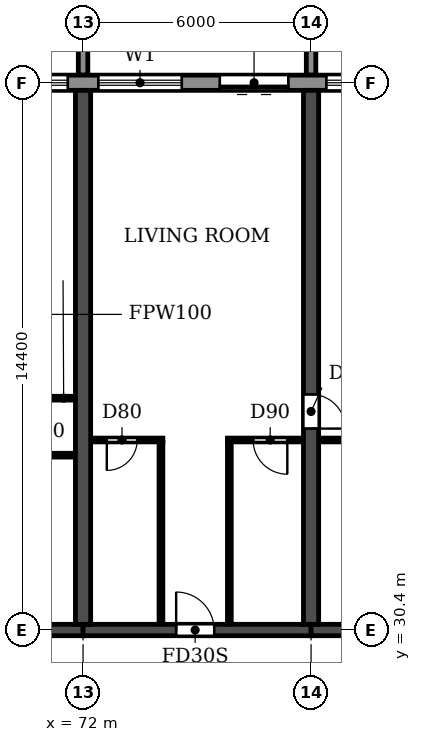
"""IFC4 building model, lengths in metres.
Left out: names, types, materials, properties, quantities, classifications, styles, units other than length and angle.
Written with IfcOpenShell. Run it as: python <this file> out.ifc"""

import sys

from ifc_helpers import new_model, si_unit, direction, frame, frame_2d, origin, place, context, subcontext, project, spatial, polyline, rectangle, outline, extrude, source, transform, mapped, element, fill, save


model = new_model("IFC4")
c1 = context("Model", 3, precision=1e-05, world=origin(), true_north=direction((0.0, 1.0)))
c2 = subcontext(c1, "Body", "Model", "MODEL_VIEW")
j1 = project(units=[si_unit("LENGTHUNIT", "METRE"), si_unit("PLANEANGLEUNIT", "RADIAN")], contexts=[c1])
p1 = place(None, origin())
s1 = spatial("IfcSite", under=j1, at=p1, CompositionType="ELEMENT")
p2 = place(p1, origin())
s2 = spatial("IfcBuilding", under=s1, at=p2, CompositionType="ELEMENT")
p3 = place(p2, frame((0.0, 0.0, 26.7)))
s3 = spatial("IfcBuildingStorey", under=s2, at=p3, CompositionType="ELEMENT", Elevation=26.7)
p4 = place(p3, frame((72.0, 30.55, 0.0), z_axis=(0.0, 0.0, 1.0), x_axis=(0.0, 1.0, 0.0)))
e1 = element("IfcWall", 1, at=p4, inside=s3, PredefinedType="SHEAR", context=c2, shape_type="SweptSolid", body=[
    extrude(rectangle(XDim=14.05, YDim=0.4, at=frame_2d((7.025, 0.0))), origin(), (0.0, 0.0, 1.0), 3.05),
])
p5 = place(p3, frame((78.0, 30.55, 0.0), z_axis=(0.0, 0.0, 1.0), x_axis=(0.0, 1.0, 0.0)))
e2 = element("IfcWall", 2, at=p5, inside=s3, PredefinedType="SHEAR", context=c2, shape_type="SweptSolid", body=[
    extrude(rectangle(XDim=14.05, YDim=0.4, at=frame_2d((7.025, 0.0))), origin(), (0.0, 0.0, 1.0), 3.05),
])
p6 = place(p5, frame((5.15, 0.0, 0.0)))
e3 = element("IfcOpeningElement", 3, at=p6, cuts=e2, PredefinedType="OPENING", context=c2, shape_type="SweptSolid", body=[
    extrude(rectangle(XDim=0.9, YDim=2.1, at=frame_2d((0.45, 1.05))), frame((0.0, 0.21, 0.0), z_axis=(0.0, -1.0, 0.0), x_axis=(1.0, 0.0, 0.0)), (0.0, 0.0, 1.0), 0.42),
])
p7 = place(p3, frame((66.0, 30.4, 0.0), z_axis=(0.0, 0.0, 1.0), x_axis=(1.0, 0.0, 0.0)))
e4 = element("IfcWall", 4, at=p7, inside=s3, PredefinedType="SHEAR", context=c2, shape_type="SweptSolid", body=[
    extrude(rectangle(XDim=6.0, YDim=0.3, at=frame_2d((3.0, 0.0))), origin(), (0.0, 0.0, 1.0), 2.45),
])
p8 = place(p3, frame((72.0, 30.4, 0.0), z_axis=(0.0, 0.0, 1.0), x_axis=(1.0, 0.0, 0.0)))
e5 = element("IfcWall", 5, at=p8, inside=s3, PredefinedType="SHEAR", context=c2, shape_type="SweptSolid", body=[
    extrude(rectangle(XDim=6.0, YDim=0.3, at=frame_2d((3.0, 0.0))), origin(), (0.0, 0.0, 1.0), 2.45),
])
p9 = place(p8, frame((2.45, 0.0, 0.0)))
e6 = element("IfcOpeningElement", 6, at=p9, cuts=e5, PredefinedType="OPENING", context=c2, shape_type="SweptSolid", body=[
    extrude(rectangle(XDim=1.0, YDim=2.1, at=frame_2d((0.5, 1.05))), frame((0.0, 0.16, 0.0), z_axis=(0.0, -1.0, 0.0), x_axis=(1.0, 0.0, 0.0)), (0.0, 0.0, 1.0), 0.32),
])
p10 = place(p3, frame((78.0, 30.4, 0.0), z_axis=(0.0, 0.0, 1.0), x_axis=(1.0, 0.0, 0.0)))
e7 = element("IfcWall", 7, at=p10, inside=s3, PredefinedType="SHEAR", context=c2, shape_type="SweptSolid", body=[
    extrude(rectangle(XDim=6.0, YDim=0.3, at=frame_2d((3.0, 0.0))), origin(), (0.0, 0.0, 1.0), 2.45),
])
p11 = place(p3, frame((97.317, 44.8, 0.0), z_axis=(0.0, 0.0, 1.0), x_axis=(-1.0, 0.0, 0.0)))
e8 = element("IfcWall", 8, at=p11, inside=s3, PredefinedType="STANDARD", context=c2, shape_type="SweptSolid", body=[
    extrude(rectangle(XDim=92.634, YDim=0.4, at=frame_2d((46.317, 0.0))), origin(), (0.0, 0.0, 1.0), 3.05),
])
p12 = place(p11, frame((88.717, 0.0, 0.9)))
e9 = element("IfcOpeningElement", 9, at=p12, cuts=e8, PredefinedType="OPENING", context=c2, shape_type="SweptSolid", body=[
    extrude(rectangle(XDim=2.2, YDim=1.5, at=frame_2d((1.1, 0.75))), frame((0.0, 0.21, 0.0), z_axis=(0.0, -1.0, 0.0), x_axis=(1.0, 0.0, 0.0)), (0.0, 0.0, 1.0), 0.42),
])
p13 = place(p11, frame((85.917, 0.0, 0.0)))
e10 = element("IfcOpeningElement", 10, at=p13, cuts=e8, PredefinedType="OPENING", context=c2, shape_type="SweptSolid", body=[
    extrude(rectangle(XDim=1.8, YDim=2.4, at=frame_2d((0.9, 1.2))), frame((0.0, 0.21, 0.0), z_axis=(0.0, -1.0, 0.0), x_axis=(1.0, 0.0, 0.0)), (0.0, 0.0, 1.0), 0.42),
])
p14 = place(p11, frame((82.717, 0.0, 0.9)))
e11 = element("IfcOpeningElement", 11, at=p14, cuts=e8, PredefinedType="OPENING", context=c2, shape_type="SweptSolid", body=[
    extrude(rectangle(XDim=2.2, YDim=1.5, at=frame_2d((1.1, 0.75))), frame((0.0, 0.21, 0.0), z_axis=(0.0, -1.0, 0.0), x_axis=(1.0, 0.0, 0.0)), (0.0, 0.0, 1.0), 0.42),
])
p15 = place(p11, frame((79.717, 0.0, 0.9)))
e12 = element("IfcOpeningElement", 12, at=p15, cuts=e8, PredefinedType="OPENING", context=c2, shape_type="SweptSolid", body=[
    extrude(rectangle(XDim=2.2, YDim=1.5, at=frame_2d((1.1, 0.75))), frame((0.0, 0.21, 0.0), z_axis=(0.0, -1.0, 0.0), x_axis=(1.0, 0.0, 0.0)), (0.0, 0.0, 1.0), 0.42),
])
p16 = place(p11, frame((76.917, 0.0, 0.0)))
e13 = element("IfcOpeningElement", 13, at=p16, cuts=e8, PredefinedType="OPENING", context=c2, shape_type="SweptSolid", body=[
    extrude(rectangle(XDim=1.8, YDim=2.4, at=frame_2d((0.9, 1.2))), frame((0.0, 0.21, 0.0), z_axis=(0.0, -1.0, 0.0), x_axis=(1.0, 0.0, 0.0)), (0.0, 0.0, 1.0), 0.42),
])
p17 = place(p11, frame((73.717, 0.0, 0.9)))
e14 = element("IfcOpeningElement", 14, at=p17, cuts=e8, PredefinedType="OPENING", context=c2, shape_type="SweptSolid", body=[
    extrude(rectangle(XDim=2.2, YDim=1.5, at=frame_2d((1.1, 0.75))), frame((0.0, 0.21, 0.0), z_axis=(0.0, -1.0, 0.0), x_axis=(1.0, 0.0, 0.0)), (0.0, 0.0, 1.0), 0.42),
])
p18 = place(p11, frame((70.717, 0.0, 0.9)))
e15 = element("IfcOpeningElement", 15, at=p18, cuts=e8, PredefinedType="OPENING", context=c2, shape_type="SweptSolid", body=[
    extrude(rectangle(XDim=2.2, YDim=1.5, at=frame_2d((1.1, 0.75))), frame((0.0, 0.21, 0.0), z_axis=(0.0, -1.0, 0.0), x_axis=(1.0, 0.0, 0.0)), (0.0, 0.0, 1.0), 0.42),
])
p19 = place(p11, frame((67.717, 0.0, 0.9)))
e16 = element("IfcOpeningElement", 16, at=p19, cuts=e8, PredefinedType="OPENING", context=c2, shape_type="SweptSolid", body=[
    extrude(rectangle(XDim=2.2, YDim=1.5, at=frame_2d((1.1, 0.75))), frame((0.0, 0.21, 0.0), z_axis=(0.0, -1.0, 0.0), x_axis=(1.0, 0.0, 0.0)), (0.0, 0.0, 1.0), 0.42),
])
p20 = place(p11, frame((64.917, 0.0, 0.0)))
e17 = element("IfcOpeningElement", 17, at=p20, cuts=e8, PredefinedType="OPENING", context=c2, shape_type="SweptSolid", body=[
    extrude(rectangle(XDim=1.8, YDim=2.4, at=frame_2d((0.9, 1.2))), frame((0.0, 0.21, 0.0), z_axis=(0.0, -1.0, 0.0), x_axis=(1.0, 0.0, 0.0)), (0.0, 0.0, 1.0), 0.42),
])
p21 = place(p11, frame((61.717, 0.0, 0.9)))
e18 = element("IfcOpeningElement", 18, at=p21, cuts=e8, PredefinedType="OPENING", context=c2, shape_type="SweptSolid", body=[
    extrude(rectangle(XDim=2.2, YDim=1.5, at=frame_2d((1.1, 0.75))), frame((0.0, 0.21, 0.0), z_axis=(0.0, -1.0, 0.0), x_axis=(1.0, 0.0, 0.0)), (0.0, 0.0, 1.0), 0.42),
])
p22 = place(p11, frame((58.717, 0.0, 0.9)))
e19 = element("IfcOpeningElement", 19, at=p22, cuts=e8, PredefinedType="OPENING", context=c2, shape_type="SweptSolid", body=[
    extrude(rectangle(XDim=2.2, YDim=1.5, at=frame_2d((1.1, 0.75))), frame((0.0, 0.21, 0.0), z_axis=(0.0, -1.0, 0.0), x_axis=(1.0, 0.0, 0.0)), (0.0, 0.0, 1.0), 0.42),
])
p23 = place(p11, frame((55.917, 0.0, 0.0)))
e20 = element("IfcOpeningElement", 20, at=p23, cuts=e8, PredefinedType="OPENING", context=c2, shape_type="SweptSolid", body=[
    extrude(rectangle(XDim=1.8, YDim=2.4, at=frame_2d((0.9, 1.2))), frame((0.0, 0.21, 0.0), z_axis=(0.0, -1.0, 0.0), x_axis=(1.0, 0.0, 0.0)), (0.0, 0.0, 1.0), 0.42),
])
p24 = place(p11, frame((52.917, 0.0, 0.0)))
e21 = element("IfcOpeningElement", 21, at=p24, cuts=e8, PredefinedType="OPENING", context=c2, shape_type="SweptSolid", body=[
    extrude(rectangle(XDim=1.8, YDim=2.4, at=frame_2d((0.9, 1.2))), frame((0.0, 0.21, 0.0), z_axis=(0.0, -1.0, 0.0), x_axis=(1.0, 0.0, 0.0)), (0.0, 0.0, 1.0), 0.42),
])
p25 = place(p11, frame((49.717, 0.0, 0.9)))
e22 = element("IfcOpeningElement", 22, at=p25, cuts=e8, PredefinedType="OPENING", context=c2, shape_type="SweptSolid", body=[
    extrude(rectangle(XDim=2.2, YDim=1.5, at=frame_2d((1.1, 0.75))), frame((0.0, 0.21, 0.0), z_axis=(0.0, -1.0, 0.0), x_axis=(1.0, 0.0, 0.0)), (0.0, 0.0, 1.0), 0.42),
])
p26 = place(p11, frame((46.917, 0.0, 0.0)))
e23 = element("IfcOpeningElement", 23, at=p26, cuts=e8, PredefinedType="OPENING", context=c2, shape_type="SweptSolid", body=[
    extrude(rectangle(XDim=1.8, YDim=2.4, at=frame_2d((0.9, 1.2))), frame((0.0, 0.21, 0.0), z_axis=(0.0, -1.0, 0.0), x_axis=(1.0, 0.0, 0.0)), (0.0, 0.0, 1.0), 0.42),
])
p27 = place(p11, frame((43.717, 0.0, 0.9)))
e24 = element("IfcOpeningElement", 24, at=p27, cuts=e8, PredefinedType="OPENING", context=c2, shape_type="SweptSolid", body=[
    extrude(rectangle(XDim=2.2, YDim=1.5, at=frame_2d((1.1, 0.75))), frame((0.0, 0.21, 0.0), z_axis=(0.0, -1.0, 0.0), x_axis=(1.0, 0.0, 0.0)), (0.0, 0.0, 1.0), 0.42),
])
p28 = place(p11, frame((40.717, 0.0, 0.9)))
e25 = element("IfcOpeningElement", 25, at=p28, cuts=e8, PredefinedType="OPENING", context=c2, shape_type="SweptSolid", body=[
    extrude(rectangle(XDim=2.2, YDim=1.5, at=frame_2d((1.1, 0.75))), frame((0.0, 0.21, 0.0), z_axis=(0.0, -1.0, 0.0), x_axis=(1.0, 0.0, 0.0)), (0.0, 0.0, 1.0), 0.42),
])
p29 = place(p11, frame((37.917, 0.0, 0.0)))
e26 = element("IfcOpeningElement", 26, at=p29, cuts=e8, PredefinedType="OPENING", context=c2, shape_type="SweptSolid", body=[
    extrude(rectangle(XDim=1.8, YDim=2.4, at=frame_2d((0.9, 1.2))), frame((0.0, 0.21, 0.0), z_axis=(0.0, -1.0, 0.0), x_axis=(1.0, 0.0, 0.0)), (0.0, 0.0, 1.0), 0.42),
])
p30 = place(p11, frame((34.917, 0.0, 0.0)))
e27 = element("IfcOpeningElement", 27, at=p30, cuts=e8, PredefinedType="OPENING", context=c2, shape_type="SweptSolid", body=[
    extrude(rectangle(XDim=1.8, YDim=2.4, at=frame_2d((0.9, 1.2))), frame((0.0, 0.21, 0.0), z_axis=(0.0, -1.0, 0.0), x_axis=(1.0, 0.0, 0.0)), (0.0, 0.0, 1.0), 0.42),
])
p31 = place(p11, frame((31.717, 0.0, 0.9)))
e28 = element("IfcOpeningElement", 28, at=p31, cuts=e8, PredefinedType="OPENING", context=c2, shape_type="SweptSolid", body=[
    extrude(rectangle(XDim=2.2, YDim=1.5, at=frame_2d((1.1, 0.75))), frame((0.0, 0.21, 0.0), z_axis=(0.0, -1.0, 0.0), x_axis=(1.0, 0.0, 0.0)), (0.0, 0.0, 1.0), 0.42),
])
p32 = place(p11, frame((28.717, 0.0, 0.9)))
e29 = element("IfcOpeningElement", 29, at=p32, cuts=e8, PredefinedType="OPENING", context=c2, shape_type="SweptSolid", body=[
    extrude(rectangle(XDim=2.2, YDim=1.5, at=frame_2d((1.1, 0.75))), frame((0.0, 0.21, 0.0), z_axis=(0.0, -1.0, 0.0), x_axis=(1.0, 0.0, 0.0)), (0.0, 0.0, 1.0), 0.42),
])
p33 = place(p11, frame((25.717, 0.0, 0.9)))
e30 = element("IfcOpeningElement", 30, at=p33, cuts=e8, PredefinedType="OPENING", context=c2, shape_type="SweptSolid", body=[
    extrude(rectangle(XDim=2.2, YDim=1.5, at=frame_2d((1.1, 0.75))), frame((0.0, 0.21, 0.0), z_axis=(0.0, -1.0, 0.0), x_axis=(1.0, 0.0, 0.0)), (0.0, 0.0, 1.0), 0.42),
])
p34 = place(p11, frame((22.717, 0.0, 0.9)))
e31 = element("IfcOpeningElement", 31, at=p34, cuts=e8, PredefinedType="OPENING", context=c2, shape_type="SweptSolid", body=[
    extrude(rectangle(XDim=2.2, YDim=1.5, at=frame_2d((1.1, 0.75))), frame((0.0, 0.21, 0.0), z_axis=(0.0, -1.0, 0.0), x_axis=(1.0, 0.0, 0.0)), (0.0, 0.0, 1.0), 0.42),
])
p35 = place(p11, frame((19.917, 0.0, 0.0)))
e32 = element("IfcOpeningElement", 32, at=p35, cuts=e8, PredefinedType="OPENING", context=c2, shape_type="SweptSolid", body=[
    extrude(rectangle(XDim=1.8, YDim=2.4, at=frame_2d((0.9, 1.2))), frame((0.0, 0.21, 0.0), z_axis=(0.0, -1.0, 0.0), x_axis=(1.0, 0.0, 0.0)), (0.0, 0.0, 1.0), 0.42),
])
p36 = place(p11, frame((16.717, 0.0, 0.9)))
e33 = element("IfcOpeningElement", 33, at=p36, cuts=e8, PredefinedType="OPENING", context=c2, shape_type="SweptSolid", body=[
    extrude(rectangle(XDim=2.2, YDim=1.5, at=frame_2d((1.1, 0.75))), frame((0.0, 0.21, 0.0), z_axis=(0.0, -1.0, 0.0), x_axis=(1.0, 0.0, 0.0)), (0.0, 0.0, 1.0), 0.42),
])
p37 = place(p11, frame((13.717, 0.0, 0.9)))
e34 = element("IfcOpeningElement", 34, at=p37, cuts=e8, PredefinedType="OPENING", context=c2, shape_type="SweptSolid", body=[
    extrude(rectangle(XDim=2.2, YDim=1.5, at=frame_2d((1.1, 0.75))), frame((0.0, 0.21, 0.0), z_axis=(0.0, -1.0, 0.0), x_axis=(1.0, 0.0, 0.0)), (0.0, 0.0, 1.0), 0.42),
])
p38 = place(p11, frame((10.717, 0.0, 0.9)))
e35 = element("IfcOpeningElement", 35, at=p38, cuts=e8, PredefinedType="OPENING", context=c2, shape_type="SweptSolid", body=[
    extrude(rectangle(XDim=2.2, YDim=1.5, at=frame_2d((1.1, 0.75))), frame((0.0, 0.21, 0.0), z_axis=(0.0, -1.0, 0.0), x_axis=(1.0, 0.0, 0.0)), (0.0, 0.0, 1.0), 0.42),
])
p39 = place(p11, frame((7.917, 0.0, 0.0)))
e36 = element("IfcOpeningElement", 36, at=p39, cuts=e8, PredefinedType="OPENING", context=c2, shape_type="SweptSolid", body=[
    extrude(rectangle(XDim=1.8, YDim=2.4, at=frame_2d((0.9, 1.2))), frame((0.0, 0.21, 0.0), z_axis=(0.0, -1.0, 0.0), x_axis=(1.0, 0.0, 0.0)), (0.0, 0.0, 1.0), 0.42),
])
p40 = place(p11, frame((4.917, 0.0, 0.0)))
e37 = element("IfcOpeningElement", 37, at=p40, cuts=e8, PredefinedType="OPENING", context=c2, shape_type="SweptSolid", body=[
    extrude(rectangle(XDim=1.8, YDim=2.4, at=frame_2d((0.9, 1.2))), frame((0.0, 0.21, 0.0), z_axis=(0.0, -1.0, 0.0), x_axis=(1.0, 0.0, 0.0)), (0.0, 0.0, 1.0), 0.42),
])
p41 = place(p11, frame((1.717, 0.0, 0.9)))
e38 = element("IfcOpeningElement", 38, at=p41, cuts=e8, PredefinedType="OPENING", context=c2, shape_type="SweptSolid", body=[
    extrude(rectangle(XDim=2.2, YDim=1.5, at=frame_2d((1.1, 0.75))), frame((0.0, 0.21, 0.0), z_axis=(0.0, -1.0, 0.0), x_axis=(1.0, 0.0, 0.0)), (0.0, 0.0, 1.0), 0.42),
])
m1 = source(origin(), c2, "Body", "SweptSolid", [
    extrude(outline(polyline([(0.0, 0.0), (0.25, 0.0), (0.25, 3.1), (0.0, 3.1), (0.0, 0.0)])), origin(), (0.0, 0.0, 1.0), 3.1),
])
for number, where in (
    (39, (71.875, 45.0, 0.0)),
    (40, (77.875, 45.0, 0.0)),
):
    element("IfcWall", number, at=place(p3, frame(where)), inside=s3, PredefinedType="STANDARD", context=c2, shape_type="MappedRepresentation", body=[
        mapped(m1, transform((0.0, 0.0, 0.0))),
    ])
p42 = place(p3, frame((66.21, 35.0, 0.0), z_axis=(0.0, 0.0, 1.0), x_axis=(1.0, 0.0, 0.0)))
e41 = element("IfcWall", 41, at=p42, inside=s3, PredefinedType="PARTITIONING", context=c2, shape_type="SweptSolid", body=[
    extrude(rectangle(XDim=5.58, YDim=0.1, at=frame_2d((2.79, 0.0))), origin(), (0.0, 0.0, 1.0), 3.05),
])
p43 = place(p42, frame((1.04, 0.0, 0.0)))
e42 = element("IfcOpeningElement", 42, at=p43, cuts=e41, PredefinedType="OPENING", context=c2, shape_type="SweptSolid", body=[
    extrude(rectangle(XDim=0.8, YDim=2.1, at=frame_2d((0.4, 1.05))), frame((0.0, 0.06, 0.0), z_axis=(0.0, -1.0, 0.0), x_axis=(1.0, 0.0, 0.0)), (0.0, 0.0, 1.0), 0.12),
])
p44 = place(p42, frame((4.04, 0.0, 0.0)))
e43 = element("IfcOpeningElement", 43, at=p44, cuts=e41, PredefinedType="OPENING", context=c2, shape_type="SweptSolid", body=[
    extrude(rectangle(XDim=0.8, YDim=2.1, at=frame_2d((0.4, 1.05))), frame((0.0, 0.06, 0.0), z_axis=(0.0, -1.0, 0.0), x_axis=(1.0, 0.0, 0.0)), (0.0, 0.0, 1.0), 0.12),
])
p45 = place(p3, frame((72.21, 35.4, 0.0), z_axis=(0.0, 0.0, 1.0), x_axis=(1.0, 0.0, 0.0)))
e44 = element("IfcWall", 44, at=p45, inside=s3, PredefinedType="PARTITIONING", context=c2, shape_type="SweptSolid", body=[
    extrude(rectangle(XDim=1.89, YDim=0.1, at=frame_2d((0.945, 0.0))), origin(), (0.0, 0.0, 1.0), 3.05),
])
p46 = place(p45, frame((0.415, 0.0, 0.0)))
e45 = element("IfcOpeningElement", 45, at=p46, cuts=e44, PredefinedType="OPENING", context=c2, shape_type="SweptSolid", body=[
    extrude(rectangle(XDim=0.8, YDim=2.1, at=frame_2d((0.4, 1.05))), frame((0.0, 0.06, 0.0), z_axis=(0.0, -1.0, 0.0), x_axis=(1.0, 0.0, 0.0)), (0.0, 0.0, 1.0), 0.12),
])
p47 = place(p3, frame((75.8, 35.4, 0.0), z_axis=(0.0, 0.0, 1.0), x_axis=(1.0, 0.0, 0.0)))
e46 = element("IfcWall", 46, at=p47, inside=s3, PredefinedType="PARTITIONING", context=c2, shape_type="SweptSolid", body=[
    extrude(rectangle(XDim=1.99, YDim=0.1, at=frame_2d((0.995, 0.0))), origin(), (0.0, 0.0, 1.0), 3.05),
])
p48 = place(p47, frame((0.675, 0.0, 0.0)))
e47 = element("IfcOpeningElement", 47, at=p48, cuts=e46, PredefinedType="OPENING", context=c2, shape_type="SweptSolid", body=[
    extrude(rectangle(XDim=0.9, YDim=2.1, at=frame_2d((0.45, 1.05))), frame((0.0, 0.06, 0.0), z_axis=(0.0, -1.0, 0.0), x_axis=(1.0, 0.0, 0.0)), (0.0, 0.0, 1.0), 0.12),
])
p49 = place(p3, frame((78.21, 35.4, 0.0), z_axis=(0.0, 0.0, 1.0), x_axis=(1.0, 0.0, 0.0)))
e48 = element("IfcWall", 48, at=p49, inside=s3, PredefinedType="PARTITIONING", context=c2, shape_type="SweptSolid", body=[
    extrude(rectangle(XDim=2.69, YDim=0.1, at=frame_2d((1.345, 0.0))), origin(), (0.0, 0.0, 1.0), 3.05),
])
p50 = place(p49, frame((0.89, 0.0, 0.0)))
e49 = element("IfcOpeningElement", 49, at=p50, cuts=e48, PredefinedType="OPENING", context=c2, shape_type="SweptSolid", body=[
    extrude(rectangle(XDim=0.8, YDim=2.1, at=frame_2d((0.4, 1.05))), frame((0.0, 0.06, 0.0), z_axis=(0.0, -1.0, 0.0), x_axis=(1.0, 0.0, 0.0)), (0.0, 0.0, 1.0), 0.12),
])
p51 = place(p3, frame((66.21, 36.5, 0.0), z_axis=(0.0, 0.0, 1.0), x_axis=(1.0, 0.0, 0.0)))
e50 = element("IfcWall", 50, at=p51, inside=s3, PredefinedType="PARTITIONING", context=c2, shape_type="SweptSolid", body=[
    extrude(rectangle(XDim=5.58, YDim=0.1, at=frame_2d((2.79, 0.0))), origin(), (0.0, 0.0, 1.0), 3.05),
])
p52 = place(p51, frame((2.74, 0.0, 0.0)))
e51 = element("IfcOpeningElement", 51, at=p52, cuts=e50, PredefinedType="OPENING", context=c2, shape_type="SweptSolid", body=[
    extrude(rectangle(XDim=0.9, YDim=2.1, at=frame_2d((0.45, 1.05))), frame((0.0, 0.06, 0.0), z_axis=(0.0, -1.0, 0.0), x_axis=(1.0, 0.0, 0.0)), (0.0, 0.0, 1.0), 0.12),
])
for number, where, z_axis, x_axis in (
    (52, (74.05, 30.56, 0.0), (0.0, 0.0, 1.0), (0.0, 1.0, 0.0)),
    (53, (75.85, 30.56, 0.0), (0.0, 0.0, 1.0), (0.0, 1.0, 0.0)),
):
    element("IfcWall", number, at=place(p3, frame(where, z_axis=z_axis, x_axis=x_axis)), inside=s3, PredefinedType="PARTITIONING", context=c2, shape_type="SweptSolid", body=[
        extrude(rectangle(XDim=4.79, YDim=0.1, at=frame_2d((2.395, 0.0))), origin(), (0.0, 0.0, 1.0), 3.05),
    ])
p53 = place(p33, origin())
e54 = element("IfcWindow", 54, at=p53, inside=s3, PartitioningType="DOUBLE_PANEL_HORIZONTAL", PredefinedType="WINDOW", context=c2, shape_type="SweptSolid", body=[
    extrude(rectangle(XDim=2.2, YDim=1.5, at=frame_2d((1.1, 0.75))), frame((0.0, 0.03, 0.0), z_axis=(0.0, -1.0, 0.0), x_axis=(1.0, 0.0, 0.0)), (0.0, 0.0, 1.0), 0.06),
])
fill(e30, e54)
p54 = place(p34, origin())
e55 = element("IfcWindow", 55, at=p54, inside=s3, PartitioningType="DOUBLE_PANEL_HORIZONTAL", PredefinedType="WINDOW", context=c2, shape_type="SweptSolid", body=[
    extrude(rectangle(XDim=2.2, YDim=1.5, at=frame_2d((1.1, 0.75))), frame((0.0, 0.03, 0.0), z_axis=(0.0, -1.0, 0.0), x_axis=(1.0, 0.0, 0.0)), (0.0, 0.0, 1.0), 0.06),
])
fill(e31, e55)
p55 = place(p35, origin())
e56 = element("IfcDoor", 56, at=p55, inside=s3, OperationType="DOUBLE_DOOR_SLIDING", PredefinedType="DOOR", context=c2, shape_type="SweptSolid", body=[
    extrude(rectangle(XDim=1.8, YDim=2.4, at=frame_2d((0.9, 1.2))), frame((0.0, 0.025, 0.0), z_axis=(0.0, -1.0, 0.0), x_axis=(1.0, 0.0, 0.0)), (0.0, 0.0, 1.0), 0.05),
])
fill(e32, e56)
p56 = place(p36, origin())
e57 = element("IfcWindow", 57, at=p56, inside=s3, PartitioningType="DOUBLE_PANEL_HORIZONTAL", PredefinedType="WINDOW", context=c2, shape_type="SweptSolid", body=[
    extrude(rectangle(XDim=2.2, YDim=1.5, at=frame_2d((1.1, 0.75))), frame((0.0, 0.03, 0.0), z_axis=(0.0, -1.0, 0.0), x_axis=(1.0, 0.0, 0.0)), (0.0, 0.0, 1.0), 0.06),
])
fill(e33, e57)
p57 = place(p46, frame((0.8, 0.0, 0.0), z_axis=(0.0, 0.0, 1.0), x_axis=(-1.0, 0.0, 0.0)))
e58 = element("IfcDoor", 58, at=p57, inside=s3, OperationType="SINGLE_SWING_RIGHT", PredefinedType="DOOR", context=c2, shape_type="SweptSolid", body=[
    extrude(rectangle(XDim=0.8, YDim=2.1, at=frame_2d((0.4, 1.05))), frame((0.0, 0.025, 0.0), z_axis=(0.0, -1.0, 0.0), x_axis=(1.0, 0.0, 0.0)), (0.0, 0.0, 1.0), 0.05),
])
fill(e45, e58)
p58 = place(p9, origin())
e59 = element("IfcDoor", 59, at=p58, inside=s3, OperationType="SINGLE_SWING_LEFT", PredefinedType="DOOR", context=c2, shape_type="SweptSolid", body=[
    extrude(rectangle(XDim=1.0, YDim=2.1, at=frame_2d((0.5, 1.05))), frame((0.0, 0.025, 0.0), z_axis=(0.0, -1.0, 0.0), x_axis=(1.0, 0.0, 0.0)), (0.0, 0.0, 1.0), 0.05),
])
fill(e6, e59)
p59 = place(p48, frame((0.9, 0.0, 0.0), z_axis=(0.0, 0.0, 1.0), x_axis=(-1.0, 0.0, 0.0)))
e60 = element("IfcDoor", 60, at=p59, inside=s3, OperationType="SINGLE_SWING_LEFT", PredefinedType="DOOR", context=c2, shape_type="SweptSolid", body=[
    extrude(rectangle(XDim=0.9, YDim=2.1, at=frame_2d((0.45, 1.05))), frame((0.0, 0.025, 0.0), z_axis=(0.0, -1.0, 0.0), x_axis=(1.0, 0.0, 0.0)), (0.0, 0.0, 1.0), 0.05),
])
fill(e47, e60)
p60 = place(p6, frame((0.9, 0.0, 0.0), z_axis=(0.0, 0.0, 1.0), x_axis=(-1.0, 0.0, 0.0)))
e61 = element("IfcDoor", 61, at=p60, inside=s3, OperationType="SINGLE_SWING_RIGHT", PredefinedType="DOOR", context=c2, shape_type="SweptSolid", body=[
    extrude(rectangle(XDim=0.9, YDim=2.1, at=frame_2d((0.45, 1.05))), frame((0.0, 0.025, 0.0), z_axis=(0.0, -1.0, 0.0), x_axis=(1.0, 0.0, 0.0)), (0.0, 0.0, 1.0), 0.05),
])
fill(e3, e61)
save(model, sys.argv[1])
